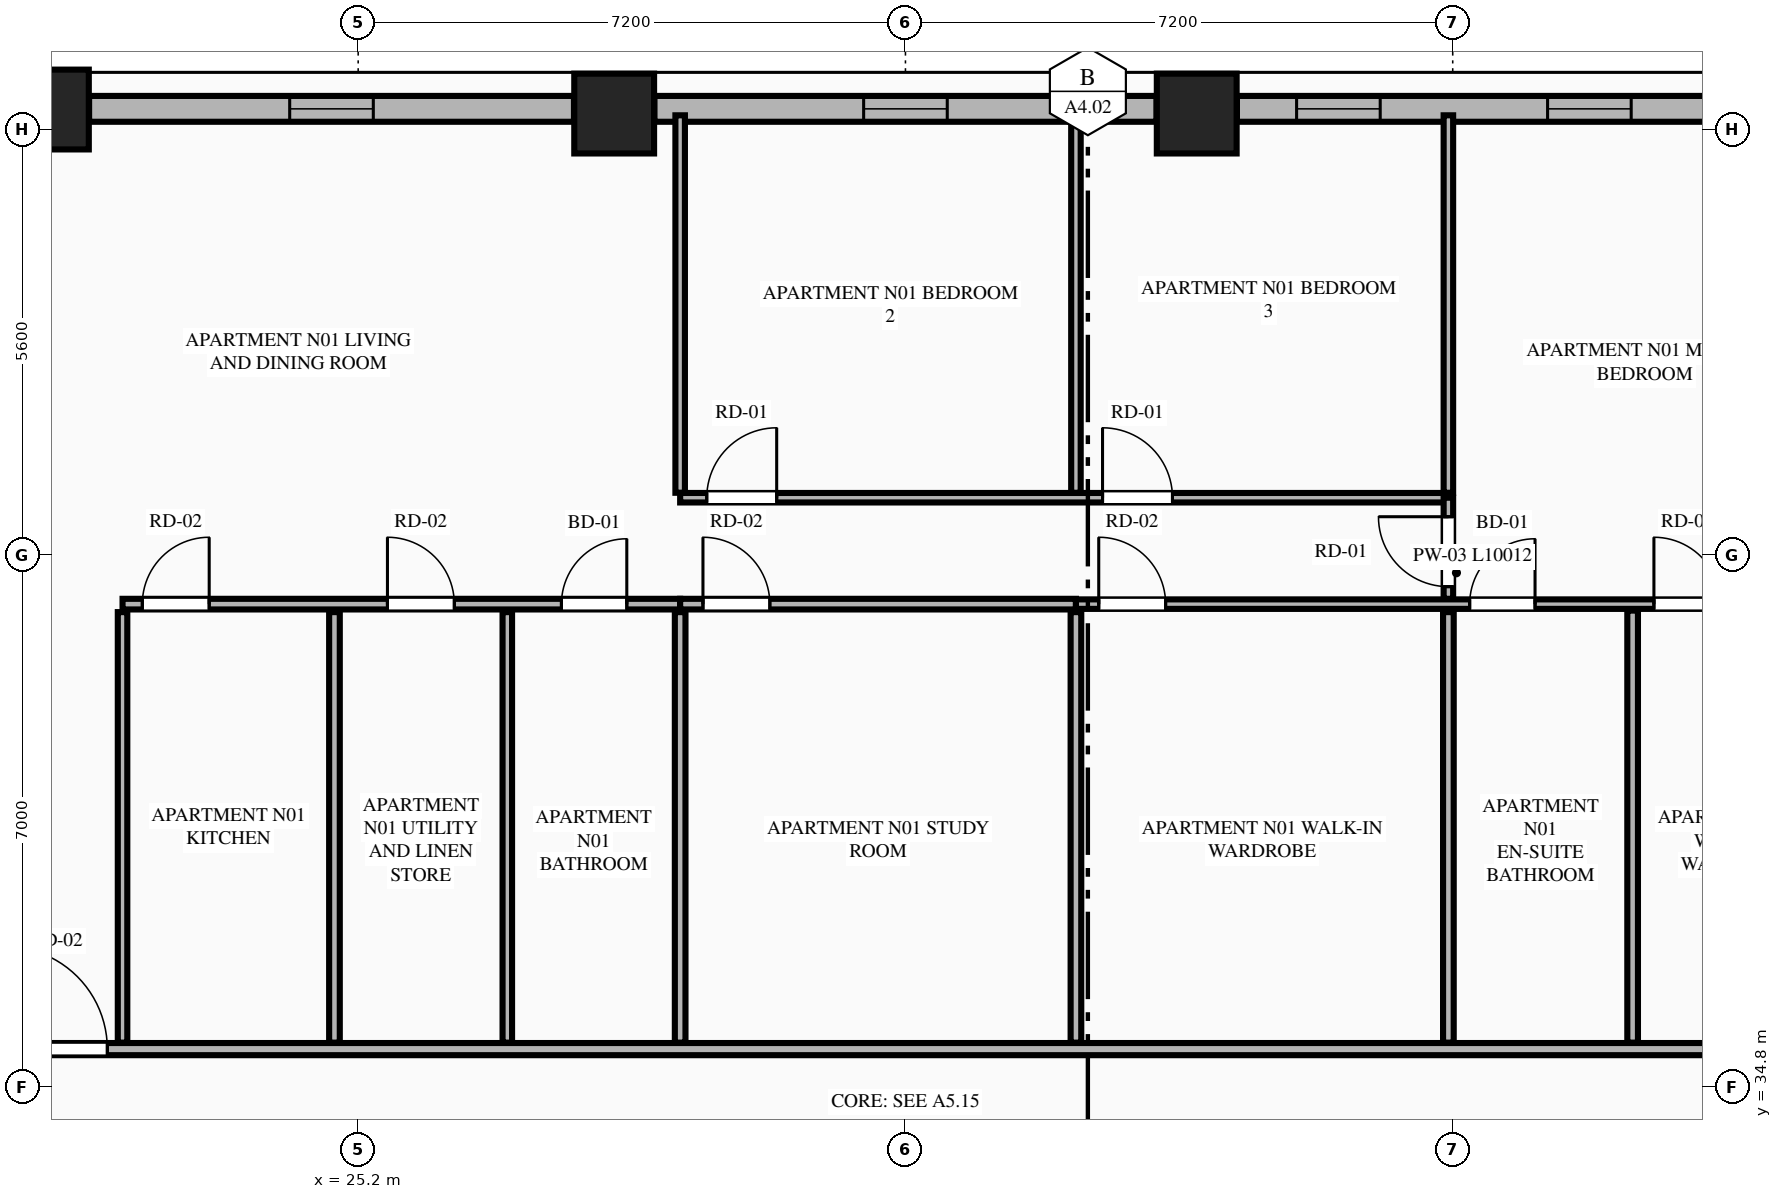
"""IFC4 building model, lengths in metres.
Left out: names, types, materials, properties, quantities, classifications, styles, units other than length and angle.
Written with IfcOpenShell. Run it as: python <this file> out.ifc"""

import sys

from ifc_helpers import new_model, si_unit, direction, frame, frame_2d, origin, origin_2d, place, context, subcontext, project, spatial, rectangle, extrude, element, fill, save


model = new_model("IFC4")
c1 = context("Model", 3, precision=1e-05, world=origin(), true_north=direction((0.0, 1.0)))
c2 = subcontext(c1, "Body", "Model", "MODEL_VIEW")
j1 = project(units=[si_unit("LENGTHUNIT", "METRE"), si_unit("PLANEANGLEUNIT", "RADIAN")], contexts=[c1])
p1 = place(None, origin())
s1 = spatial("IfcSite", under=j1, at=p1, CompositionType="ELEMENT")
p2 = place(p1, origin())
s2 = spatial("IfcBuilding", under=s1, at=p2, CompositionType="ELEMENT")
p3 = place(p2, frame((0.0, 0.0, 126.8)))
s3 = spatial("IfcBuildingStorey", under=s2, at=p3, CompositionType="ELEMENT", Elevation=126.8)
for number, where, z_axis, x_axis in (
    (1, (36.232, 47.608, 0.0), (0.0, 0.0, 1.0), (1.0, 0.0, 0.0)),
    (2, (28.568, 47.608, 0.0), (0.0, 0.0, 1.0), (1.0, 0.0, 0.0)),
    (3, (21.131, 47.661, 0.0), (0.0, 0.0, 1.0), (1.0, 0.0, 0.0)),
):
    element("IfcColumn", number, at=place(p3, frame(where, z_axis=z_axis, x_axis=x_axis)), inside=s3, PredefinedType="COLUMN", context=c2, shape_type="SweptSolid", body=[
        extrude(rectangle(XDim=1.05, YDim=1.05, at=origin_2d()), origin(), (0.0, 0.0, 1.0), 3.55),
    ])
p4 = place(p3, frame((43.14, 47.67, 0.0), z_axis=(0.0, 0.0, 1.0), x_axis=(-1.0, 0.0, 0.0)))
e4 = element("IfcWall", 4, at=p4, inside=s3, PredefinedType="STANDARD", context=c2, shape_type="SweptSolid", body=[
    extrude(rectangle(XDim=6.379, YDim=0.34, at=frame_2d((3.189, 0.0))), origin(), (0.0, 0.0, 1.0), 2.797),
])
p5 = place(p4, frame((1.192, 0.0, 0.75)))
e5 = element("IfcOpeningElement", 5, at=p5, cuts=e4, PredefinedType="OPENING", context=c2, shape_type="SweptSolid", body=[
    extrude(rectangle(XDim=1.1, YDim=1.897, at=frame_2d((0.55, 0.948))), frame((0.0, 0.18, 0.0), z_axis=(0.0, -1.0, 0.0), x_axis=(1.0, 0.0, 0.0)), (0.0, 0.0, 1.0), 0.36),
])
p6 = place(p4, frame((4.494, 0.0, 0.75)))
e6 = element("IfcOpeningElement", 6, at=p6, cuts=e4, PredefinedType="OPENING", context=c2, shape_type="SweptSolid", body=[
    extrude(rectangle(XDim=1.1, YDim=1.897, at=frame_2d((0.55, 0.948))), frame((0.0, 0.18, 0.0), z_axis=(0.0, -1.0, 0.0), x_axis=(1.0, 0.0, 0.0)), (0.0, 0.0, 1.0), 0.36),
])
p7 = place(p3, frame((35.703, 47.67, 0.0), z_axis=(0.0, 0.0, 1.0), x_axis=(-1.0, 0.0, 0.0)))
e7 = element("IfcWall", 7, at=p7, inside=s3, PredefinedType="STANDARD", context=c2, shape_type="SweptSolid", body=[
    extrude(rectangle(XDim=6.606, YDim=0.34, at=frame_2d((3.303, 0.0))), origin(), (0.0, 0.0, 1.0), 2.797),
])
p8 = place(p7, frame((2.753, 0.0, 0.75)))
e8 = element("IfcOpeningElement", 8, at=p8, cuts=e7, PredefinedType="OPENING", context=c2, shape_type="SweptSolid", body=[
    extrude(rectangle(XDim=1.1, YDim=1.897, at=frame_2d((0.55, 0.948))), frame((0.0, 0.18, 0.0), z_axis=(0.0, -1.0, 0.0), x_axis=(1.0, 0.0, 0.0)), (0.0, 0.0, 1.0), 0.36),
])
p9 = place(p3, frame((28.039, 47.67, 0.0), z_axis=(0.0, 0.0, 1.0), x_axis=(-1.0, 0.0, 0.0)))
e9 = element("IfcWall", 9, at=p9, inside=s3, PredefinedType="STANDARD", context=c2, shape_type="SweptSolid", body=[
    extrude(rectangle(XDim=6.379, YDim=0.34, at=frame_2d((3.189, 0.0))), origin(), (0.0, 0.0, 1.0), 2.797),
])
p10 = place(p9, frame((2.64, 0.0, 0.75)))
e10 = element("IfcOpeningElement", 10, at=p10, cuts=e9, PredefinedType="OPENING", context=c2, shape_type="SweptSolid", body=[
    extrude(rectangle(XDim=1.1, YDim=1.897, at=frame_2d((0.55, 0.948))), frame((0.0, 0.18, 0.0), z_axis=(0.0, -1.0, 0.0), x_axis=(1.0, 0.0, 0.0)), (0.0, 0.0, 1.0), 0.36),
])
p11 = place(p3, frame((20.145, 35.3, 0.0), z_axis=(0.0, 0.0, 1.0), x_axis=(1.0, 0.0, 0.0)))
e11 = element("IfcWall", 11, at=p11, inside=s3, PredefinedType="PARTITIONING", context=c2, shape_type="SweptSolid", body=[
    extrude(rectangle(XDim=24.51, YDim=0.16, at=frame_2d((12.255, 0.0))), origin(), (0.0, 0.0, 1.0), 3.34),
])
p12 = place(p11, frame((0.405, 0.0, 0.0)))
e12 = element("IfcOpeningElement", 12, at=p12, cuts=e11, PredefinedType="OPENING", context=c2, shape_type="SweptSolid", body=[
    extrude(rectangle(XDim=1.35, YDim=2.35, at=frame_2d((0.675, 1.175))), frame((0.0, 0.09, 0.0), z_axis=(0.0, -1.0, 0.0), x_axis=(1.0, 0.0, 0.0)), (0.0, 0.0, 1.0), 0.18),
])
p13 = place(p3, frame((22.1, 35.385, 0.0), z_axis=(0.0, 0.0, 1.0), x_axis=(0.0, 1.0, 0.0)))
e13 = element("IfcWall", 13, at=p13, inside=s3, PredefinedType="PARTITIONING", context=c2, shape_type="SweptSolid", body=[
    extrude(rectangle(XDim=5.664, YDim=0.125, at=frame_2d((2.832, 0.0))), origin(), (0.0, 0.0, 1.0), 2.722),
])
p14 = place(p3, frame((22.1, 41.154, 0.0), z_axis=(0.0, 0.0, 1.0), x_axis=(1.0, 0.0, 0.0)))
e14 = element("IfcWall", 14, at=p14, inside=s3, PredefinedType="PLUMBINGWALL", context=c2, shape_type="SweptSolid", body=[
    extrude(rectangle(XDim=7.336, YDim=0.14, at=frame_2d((3.668, 0.0))), origin(), (0.0, 0.0, 1.0), 3.34),
])
p15 = place(p14, frame((5.774, 0.0, 0.0)))
e15 = element("IfcOpeningElement", 15, at=p15, cuts=e14, PredefinedType="OPENING", context=c2, shape_type="SweptSolid", body=[
    extrude(rectangle(XDim=0.86, YDim=2.1, at=frame_2d((0.43, 1.05))), frame((0.0, 0.08, 0.0), z_axis=(0.0, -1.0, 0.0), x_axis=(1.0, 0.0, 0.0)), (0.0, 0.0, 1.0), 0.16),
])
p16 = place(p14, frame((0.26, 0.0, 0.0)))
e16 = element("IfcOpeningElement", 16, at=p16, cuts=e14, PredefinedType="OPENING", context=c2, shape_type="SweptSolid", body=[
    extrude(rectangle(XDim=0.88, YDim=2.15, at=frame_2d((0.44, 1.075))), frame((0.0, 0.08, 0.0), z_axis=(0.0, -1.0, 0.0), x_axis=(1.0, 0.0, 0.0)), (0.0, 0.0, 1.0), 0.16),
])
p17 = place(p14, frame((3.485, 0.0, 0.0)))
e17 = element("IfcOpeningElement", 17, at=p17, cuts=e14, PredefinedType="OPENING", context=c2, shape_type="SweptSolid", body=[
    extrude(rectangle(XDim=0.88, YDim=2.15, at=frame_2d((0.44, 1.075))), frame((0.0, 0.08, 0.0), z_axis=(0.0, -1.0, 0.0), x_axis=(1.0, 0.0, 0.0)), (0.0, 0.0, 1.0), 0.16),
])
p18 = place(p3, frame((29.436, 41.154, 0.0), z_axis=(0.0, 0.0, 1.0), x_axis=(1.0, 0.0, 0.0)))
e18 = element("IfcWall", 18, at=p18, inside=s3, PredefinedType="PLUMBINGWALL", context=c2, shape_type="SweptSolid", body=[
    extrude(rectangle(XDim=5.207, YDim=0.14, at=frame_2d((2.604, 0.0))), origin(), (0.0, 0.0, 1.0), 3.34),
])
p19 = place(p18, frame((0.3, 0.0, 0.0)))
e19 = element("IfcOpeningElement", 19, at=p19, cuts=e18, PredefinedType="OPENING", context=c2, shape_type="SweptSolid", body=[
    extrude(rectangle(XDim=0.88, YDim=2.15, at=frame_2d((0.44, 1.075))), frame((0.0, 0.08, 0.0), z_axis=(0.0, -1.0, 0.0), x_axis=(1.0, 0.0, 0.0)), (0.0, 0.0, 1.0), 0.16),
])
p20 = place(p3, frame((34.643, 41.154, 0.0), z_axis=(0.0, 0.0, 1.0), x_axis=(1.0, 0.0, 0.0)))
e20 = element("IfcWall", 20, at=p20, inside=s3, PredefinedType="PARTITIONING", context=c2, shape_type="SweptSolid", body=[
    extrude(rectangle(XDim=10.012, YDim=0.125, at=frame_2d((5.006, 0.0))), origin(), (0.0, 0.0, 1.0), 3.34),
])
p21 = place(p20, frame((5.18, 0.0, 0.0)))
e21 = element("IfcOpeningElement", 21, at=p21, cuts=e20, PredefinedType="OPENING", context=c2, shape_type="SweptSolid", body=[
    extrude(rectangle(XDim=0.86, YDim=2.1, at=frame_2d((0.43, 1.05))), frame((0.0, 0.073, 0.0), z_axis=(0.0, -1.0, 0.0), x_axis=(1.0, 0.0, 0.0)), (0.0, 0.0, 1.0), 0.145),
])
p22 = place(p20, frame((7.604, 0.0, 0.0)))
e22 = element("IfcOpeningElement", 22, at=p22, cuts=e20, PredefinedType="OPENING", context=c2, shape_type="SweptSolid", body=[
    extrude(rectangle(XDim=0.88, YDim=2.15, at=frame_2d((0.44, 1.075))), frame((0.0, 0.073, 0.0), z_axis=(0.0, -1.0, 0.0), x_axis=(1.0, 0.0, 0.0)), (0.0, 0.0, 1.0), 0.145),
])
p23 = place(p20, frame((0.3, 0.0, 0.0)))
e23 = element("IfcOpeningElement", 23, at=p23, cuts=e20, PredefinedType="OPENING", context=c2, shape_type="SweptSolid", body=[
    extrude(rectangle(XDim=0.88, YDim=2.15, at=frame_2d((0.44, 1.075))), frame((0.0, 0.073, 0.0), z_axis=(0.0, -1.0, 0.0), x_axis=(1.0, 0.0, 0.0)), (0.0, 0.0, 1.0), 0.145),
])
p24 = place(p3, frame((24.888, 35.385, 0.0), z_axis=(0.0, 0.0, 1.0), x_axis=(0.0, 1.0, 0.0)))
e24 = element("IfcWall", 24, at=p24, inside=s3, PredefinedType="PLUMBINGWALL", context=c2, shape_type="SweptSolid", body=[
    extrude(rectangle(XDim=5.664, YDim=0.14, at=frame_2d((2.832, 0.0))), origin(), (0.0, 0.0, 1.0), 3.34),
])
p25 = place(p3, frame((27.162, 35.385, 0.0), z_axis=(0.0, 0.0, 1.0), x_axis=(0.0, 1.0, 0.0)))
e25 = element("IfcWall", 25, at=p25, inside=s3, PredefinedType="PARTITIONING", context=c2, shape_type="SweptSolid", body=[
    extrude(rectangle(XDim=5.664, YDim=0.125, at=frame_2d((2.832, 0.0))), origin(), (0.0, 0.0, 1.0), 3.34),
])
p26 = place(p3, frame((29.436, 42.619, 0.0), z_axis=(0.0, 0.0, 1.0), x_axis=(0.0, 1.0, 0.0)))
e26 = element("IfcWall", 26, at=p26, inside=s3, PredefinedType="PARTITIONING", context=c2, shape_type="SweptSolid", body=[
    extrude(rectangle(XDim=4.966, YDim=0.125, at=frame_2d((2.483, 0.0))), origin(), (0.0, 0.0, 1.0), 3.34),
])
p27 = place(p3, frame((29.436, 42.554, 0.0), z_axis=(0.0, 0.0, 1.0), x_axis=(1.0, 0.0, 0.0)))
e27 = element("IfcWall", 27, at=p27, inside=s3, PredefinedType="PARTITIONING", context=c2, shape_type="SweptSolid", body=[
    extrude(rectangle(XDim=10.107, YDim=0.125, at=frame_2d((5.053, 0.0))), origin(), (0.0, 0.0, 1.0), 2.975),
])
p28 = place(p27, frame((0.35, 0.0, 0.0)))
e28 = element("IfcOpeningElement", 28, at=p28, cuts=e27, PredefinedType="OPENING", context=c2, shape_type="SweptSolid", body=[
    extrude(rectangle(XDim=0.92, YDim=2.15, at=frame_2d((0.46, 1.075))), frame((0.0, 0.073, 0.0), z_axis=(0.0, -1.0, 0.0), x_axis=(1.0, 0.0, 0.0)), (0.0, 0.0, 1.0), 0.145),
])
p29 = place(p27, frame((5.557, 0.0, 0.0)))
e29 = element("IfcOpeningElement", 29, at=p29, cuts=e27, PredefinedType="OPENING", context=c2, shape_type="SweptSolid", body=[
    extrude(rectangle(XDim=0.92, YDim=2.15, at=frame_2d((0.46, 1.075))), frame((0.0, 0.073, 0.0), z_axis=(0.0, -1.0, 0.0), x_axis=(1.0, 0.0, 0.0)), (0.0, 0.0, 1.0), 0.145),
])
p30 = place(p3, frame((39.543, 41.224, 0.0), z_axis=(0.0, 0.0, 1.0), x_axis=(0.0, 1.0, 0.0)))
e30 = element("IfcWall", 30, at=p30, inside=s3, PredefinedType="PARTITIONING", context=c2, shape_type="SweptSolid", body=[
    extrude(rectangle(XDim=1.33, YDim=0.125, at=frame_2d((0.665, 0.0))), origin(), (0.0, 0.0, 1.0), 3.34),
])
p31 = place(p30, frame((0.16, 0.0, 0.0)))
e31 = element("IfcOpeningElement", 31, at=p31, cuts=e30, PredefinedType="OPENING", context=c2, shape_type="SweptSolid", body=[
    extrude(rectangle(XDim=0.92, YDim=2.15, at=frame_2d((0.46, 1.075))), frame((0.0, 0.073, 0.0), z_axis=(0.0, -1.0, 0.0), x_axis=(1.0, 0.0, 0.0)), (0.0, 0.0, 1.0), 0.145),
])
for number, where, z_axis, x_axis in (
    (32, (29.436, 35.385, 0.0), (0.0, 0.0, 1.0), (0.0, 1.0, 0.0)),
    (33, (34.643, 35.385, 0.0), (0.0, 0.0, 1.0), (0.0, 1.0, 0.0)),
):
    element("IfcWall", number, at=place(p3, frame(where, z_axis=z_axis, x_axis=x_axis)), inside=s3, PredefinedType="PLUMBINGWALL", context=c2, shape_type="SweptSolid", body=[
        extrude(rectangle(XDim=5.664, YDim=0.14, at=frame_2d((2.832, 0.0))), origin(), (0.0, 0.0, 1.0), 3.34),
    ])
for number, where, z_axis, x_axis in (
    (34, (34.643, 42.619, 0.0), (0.0, 0.0, 1.0), (0.0, 1.0, 0.0)),
    (35, (39.543, 42.619, 0.0), (0.0, 0.0, 1.0), (0.0, 1.0, 0.0)),
):
    element("IfcWall", number, at=place(p3, frame(where, z_axis=z_axis, x_axis=x_axis)), inside=s3, PredefinedType="PARTITIONING", context=c2, shape_type="SweptSolid", body=[
        extrude(rectangle(XDim=4.966, YDim=0.125, at=frame_2d((2.483, 0.0))), origin(), (0.0, 0.0, 1.0), 3.34),
    ])
p32 = place(p3, frame((39.543, 35.385, 0.0), z_axis=(0.0, 0.0, 1.0), x_axis=(0.0, 1.0, 0.0)))
e36 = element("IfcWall", 36, at=p32, inside=s3, PredefinedType="PLUMBINGWALL", context=c2, shape_type="SweptSolid", body=[
    extrude(rectangle(XDim=5.664, YDim=0.14, at=frame_2d((2.832, 0.0))), origin(), (0.0, 0.0, 1.0), 3.34),
])
p33 = place(p3, frame((41.967, 35.385, 0.0), z_axis=(0.0, 0.0, 1.0), x_axis=(0.0, 1.0, 0.0)))
e37 = element("IfcWall", 37, at=p33, inside=s3, PredefinedType="PLUMBINGWALL", context=c2, shape_type="SweptSolid", body=[
    extrude(rectangle(XDim=5.684, YDim=0.14, at=frame_2d((2.842, 0.0))), origin(), (0.0, 0.0, 1.0), 2.722),
])
p34 = place(p5, origin())
e38 = element("IfcWindow", 38, at=p34, inside=s3, PartitioningType="SINGLE_PANEL", PredefinedType="WINDOW", context=c2, shape_type="SweptSolid", body=[
    extrude(rectangle(XDim=1.1, YDim=1.897, at=frame_2d((0.55, 0.948))), frame((0.0, 0.03, 0.0), z_axis=(0.0, -1.0, 0.0), x_axis=(1.0, 0.0, 0.0)), (0.0, 0.0, 1.0), 0.06),
])
fill(e5, e38)
p35 = place(p8, origin())
e39 = element("IfcWindow", 39, at=p35, inside=s3, PartitioningType="SINGLE_PANEL", PredefinedType="WINDOW", context=c2, shape_type="SweptSolid", body=[
    extrude(rectangle(XDim=1.1, YDim=1.897, at=frame_2d((0.55, 0.948))), frame((0.0, 0.03, 0.0), z_axis=(0.0, -1.0, 0.0), x_axis=(1.0, 0.0, 0.0)), (0.0, 0.0, 1.0), 0.06),
])
fill(e8, e39)
p36 = place(p10, origin())
e40 = element("IfcWindow", 40, at=p36, inside=s3, PartitioningType="SINGLE_PANEL", PredefinedType="WINDOW", context=c2, shape_type="SweptSolid", body=[
    extrude(rectangle(XDim=1.1, YDim=1.897, at=frame_2d((0.55, 0.948))), frame((0.0, 0.03, 0.0), z_axis=(0.0, -1.0, 0.0), x_axis=(1.0, 0.0, 0.0)), (0.0, 0.0, 1.0), 0.06),
])
fill(e10, e40)
p37 = place(p15, origin())
e41 = element("IfcDoor", 41, at=p37, inside=s3, OperationType="SINGLE_SWING_RIGHT", PredefinedType="DOOR", context=c2, shape_type="SweptSolid", body=[
    extrude(rectangle(XDim=0.86, YDim=2.1, at=frame_2d((0.43, 1.05))), frame((0.0, 0.025, 0.0), z_axis=(0.0, -1.0, 0.0), x_axis=(1.0, 0.0, 0.0)), (0.0, 0.0, 1.0), 0.05),
])
fill(e15, e41)
p38 = place(p21, origin())
e42 = element("IfcDoor", 42, at=p38, inside=s3, OperationType="SINGLE_SWING_RIGHT", PredefinedType="DOOR", context=c2, shape_type="SweptSolid", body=[
    extrude(rectangle(XDim=0.86, YDim=2.1, at=frame_2d((0.43, 1.05))), frame((0.0, 0.025, 0.0), z_axis=(0.0, -1.0, 0.0), x_axis=(1.0, 0.0, 0.0)), (0.0, 0.0, 1.0), 0.05),
])
fill(e21, e42)
p39 = place(p22, origin())
e43 = element("IfcDoor", 43, at=p39, inside=s3, OperationType="SINGLE_SWING_LEFT", PredefinedType="DOOR", context=c2, shape_type="SweptSolid", body=[
    extrude(rectangle(XDim=0.88, YDim=2.15, at=frame_2d((0.44, 1.075))), frame((0.0, 0.025, 0.0), z_axis=(0.0, -1.0, 0.0), x_axis=(1.0, 0.0, 0.0)), (0.0, 0.0, 1.0), 0.05),
])
fill(e22, e43)
p40 = place(p12, origin())
e44 = element("IfcDoor", 44, at=p40, inside=s3, OperationType="SINGLE_SWING_LEFT", PredefinedType="DOOR", context=c2, shape_type="SweptSolid", body=[
    extrude(rectangle(XDim=1.35, YDim=2.35, at=frame_2d((0.675, 1.175))), frame((0.0, 0.025, 0.0), z_axis=(0.0, -1.0, 0.0), x_axis=(1.0, 0.0, 0.0)), (0.0, 0.0, 1.0), 0.05),
])
fill(e12, e44)
p41 = place(p16, origin())
e45 = element("IfcDoor", 45, at=p41, inside=s3, OperationType="SINGLE_SWING_RIGHT", PredefinedType="DOOR", context=c2, shape_type="SweptSolid", body=[
    extrude(rectangle(XDim=0.88, YDim=2.15, at=frame_2d((0.44, 1.075))), frame((0.0, 0.025, 0.0), z_axis=(0.0, -1.0, 0.0), x_axis=(1.0, 0.0, 0.0)), (0.0, 0.0, 1.0), 0.05),
])
fill(e16, e45)
p42 = place(p17, origin())
e46 = element("IfcDoor", 46, at=p42, inside=s3, OperationType="SINGLE_SWING_LEFT", PredefinedType="DOOR", context=c2, shape_type="SweptSolid", body=[
    extrude(rectangle(XDim=0.88, YDim=2.15, at=frame_2d((0.44, 1.075))), frame((0.0, 0.025, 0.0), z_axis=(0.0, -1.0, 0.0), x_axis=(1.0, 0.0, 0.0)), (0.0, 0.0, 1.0), 0.05),
])
fill(e17, e46)
p43 = place(p19, origin())
e47 = element("IfcDoor", 47, at=p43, inside=s3, OperationType="SINGLE_SWING_LEFT", PredefinedType="DOOR", context=c2, shape_type="SweptSolid", body=[
    extrude(rectangle(XDim=0.88, YDim=2.15, at=frame_2d((0.44, 1.075))), frame((0.0, 0.025, 0.0), z_axis=(0.0, -1.0, 0.0), x_axis=(1.0, 0.0, 0.0)), (0.0, 0.0, 1.0), 0.05),
])
fill(e19, e47)
p44 = place(p28, origin())
e48 = element("IfcDoor", 48, at=p44, inside=s3, OperationType="SINGLE_SWING_RIGHT", PredefinedType="DOOR", context=c2, shape_type="SweptSolid", body=[
    extrude(rectangle(XDim=0.92, YDim=2.15, at=frame_2d((0.46, 1.075))), frame((0.0, 0.025, 0.0), z_axis=(0.0, -1.0, 0.0), x_axis=(1.0, 0.0, 0.0)), (0.0, 0.0, 1.0), 0.05),
])
fill(e28, e48)
p45 = place(p29, origin())
e49 = element("IfcDoor", 49, at=p45, inside=s3, OperationType="SINGLE_SWING_LEFT", PredefinedType="DOOR", context=c2, shape_type="SweptSolid", body=[
    extrude(rectangle(XDim=0.92, YDim=2.15, at=frame_2d((0.46, 1.075))), frame((0.0, 0.025, 0.0), z_axis=(0.0, -1.0, 0.0), x_axis=(1.0, 0.0, 0.0)), (0.0, 0.0, 1.0), 0.05),
])
fill(e29, e49)
p46 = place(p31, origin())
e50 = element("IfcDoor", 50, at=p46, inside=s3, OperationType="SINGLE_SWING_RIGHT", PredefinedType="DOOR", context=c2, shape_type="SweptSolid", body=[
    extrude(rectangle(XDim=0.92, YDim=2.15, at=frame_2d((0.46, 1.075))), frame((0.0, 0.025, 0.0), z_axis=(0.0, -1.0, 0.0), x_axis=(1.0, 0.0, 0.0)), (0.0, 0.0, 1.0), 0.05),
])
fill(e31, e50)
p47 = place(p23, origin())
e51 = element("IfcDoor", 51, at=p47, inside=s3, OperationType="SINGLE_SWING_LEFT", PredefinedType="DOOR", context=c2, shape_type="SweptSolid", body=[
    extrude(rectangle(XDim=0.88, YDim=2.15, at=frame_2d((0.44, 1.075))), frame((0.0, 0.025, 0.0), z_axis=(0.0, -1.0, 0.0), x_axis=(1.0, 0.0, 0.0)), (0.0, 0.0, 1.0), 0.05),
])
fill(e23, e51)
p48 = place(p6, origin())
e52 = element("IfcWindow", 52, at=p48, inside=s3, PartitioningType="SINGLE_PANEL", PredefinedType="WINDOW", context=c2, shape_type="SweptSolid", body=[
    extrude(rectangle(XDim=1.1, YDim=1.897, at=frame_2d((0.55, 0.948))), frame((0.0, 0.03, 0.0), z_axis=(0.0, -1.0, 0.0), x_axis=(1.0, 0.0, 0.0)), (0.0, 0.0, 1.0), 0.06),
])
fill(e6, e52)
save(model, sys.argv[1])
